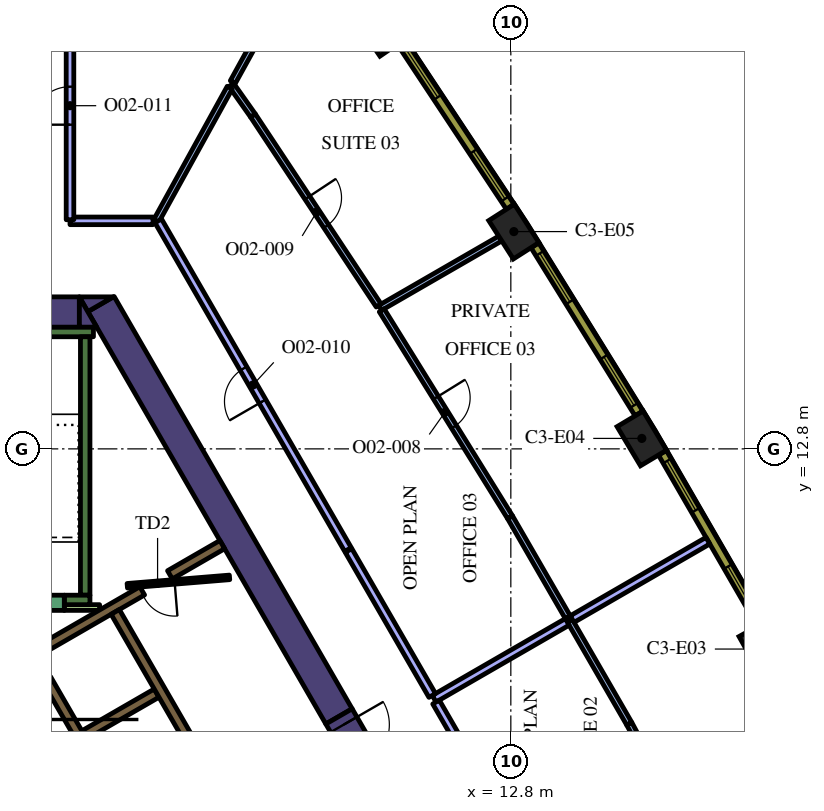
"""IFC4 building model, lengths in metres.
Left out: names, types, materials, properties, quantities, classifications, styles, units other than length and angle.
Written with IfcOpenShell. Run it as: python <this file> out.ifc"""

import sys

from ifc_helpers import new_model, si_unit, direction, frame, frame_2d, origin, origin_2d, place, context, subcontext, project, spatial, polyline, rectangle, outline, extrude, element, fill, save


model = new_model("IFC4")
c1 = context("Model", 3, precision=1e-05, world=origin(), true_north=direction((0.0, 1.0)))
c2 = subcontext(c1, "Body", "Model", "MODEL_VIEW")
j1 = project(units=[si_unit("LENGTHUNIT", "METRE"), si_unit("PLANEANGLEUNIT", "RADIAN")], contexts=[c1])
p1 = place(None, origin())
s1 = spatial("IfcSite", under=j1, at=p1, CompositionType="ELEMENT")
p2 = place(p1, origin())
s2 = spatial("IfcBuilding", under=s1, at=p2, CompositionType="ELEMENT")
p3 = place(p2, frame((0.0, 0.0, 158.4)))
s3 = spatial("IfcBuildingStorey", under=s2, at=p3, CompositionType="ELEMENT", Elevation=158.4)
for number, where, z_axis, x_axis in (
    (1, (19.447, 7.533, 0.0), (0.0, 0.0, 1.0), (-0.487, 0.874, 0.0)),
    (2, (16.247, 13.075, 0.0), (0.0, 0.0, 1.0), (-0.513, 0.858, 0.0)),
    (3, (12.88, 18.517, 0.0), (0.0, 0.0, 1.0), (-0.539, 0.842, 0.0)),
    (4, (9.348, 23.854, 0.0), (0.0, 0.0, 1.0), (-0.565, 0.825, 0.0)),
):
    element("IfcColumn", number, at=place(p3, frame(where, z_axis=z_axis, x_axis=x_axis)), inside=s3, PredefinedType="COLUMN", context=c2, shape_type="SweptSolid", body=[
        extrude(rectangle(XDim=1.2, YDim=0.8, at=origin_2d()), origin(), (0.0, 0.0, 1.0), 4.2),
    ])
p4 = place(p3, frame((8.279, 5.761, 0.0), z_axis=(0.0, 0.0, 1.0), x_axis=(-0.500010359015, 0.866019422922, 0.0)))
e5 = element("IfcWall", 5, at=p4, inside=s3, PredefinedType="SOLIDWALL", context=c2, shape_type="SweptSolid", body=[
    extrude(rectangle(XDim=12.528, YDim=0.8, at=frame_2d((6.264, 0.0))), origin(), (0.0, 0.0, 1.0), 4.2),
])
p5 = place(p3, origin())
e6 = element("IfcWall", 6, at=p5, inside=s3, PredefinedType="SOLIDWALL", context=c2, shape_type="SweptSolid", body=[
    extrude(outline(polyline([(1.443, 16.8), (2.339, 16.8), (1.667, 16.412), (1.443, 16.8)])), origin(), (0.0, 0.0, 1.0), 4.2),
])
p6 = place(p3, frame((-2.379, 16.4, 0.0), z_axis=(0.0, 0.0, 1.0), x_axis=(1.0, 0.0, 0.0)))
e7 = element("IfcWall", 7, at=p6, inside=s3, PredefinedType="SOLIDWALL", context=c2, shape_type="SweptSolid", body=[
    extrude(rectangle(XDim=3.824, YDim=0.8, at=frame_2d((1.912, 0.0))), origin(), (0.0, 0.0, 1.0), 4.2),
])
e8 = element("IfcWall", 8, at=p5, inside=s3, PredefinedType="SOLIDWALL", context=c2, shape_type="SweptSolid", body=[
    extrude(outline(polyline([(1.905, 16.0), (1.447, 16.0), (1.447, 16.793), (1.905, 16.0)])), origin(), (0.0, 0.0, 1.0), 4.2),
])
p7 = place(p3, frame((-1.817, 15.875, 0.0), z_axis=(0.0, 0.0, 1.0), x_axis=(1.0, 0.0, 0.0)))
e9 = element("IfcWall", 9, at=p7, inside=s3, PredefinedType="SOLIDWALL", context=c2, shape_type="SweptSolid", body=[
    extrude(rectangle(XDim=3.634, YDim=0.25, at=frame_2d((1.817, 0.0))), origin(), (0.0, 0.0, 1.0), 4.2),
])
p8 = place(p3, frame((1.6, 8.95, 0.0), z_axis=(0.0, 0.0, 1.0), x_axis=(0.0, 1.0, 0.0)))
e10 = element("IfcWall", 10, at=p8, inside=s3, PredefinedType="SOLIDWALL", context=c2, shape_type="SweptSolid", body=[
    extrude(rectangle(XDim=6.8, YDim=0.25, at=frame_2d((3.4, 0.0))), origin(), (0.0, 0.0, 1.0), 4.2),
])
p9 = place(p3, frame((1.05, 8.825, 0.0), z_axis=(0.0, 0.0, 1.0), x_axis=(1.0, 0.0, 0.0)))
e11 = element("IfcWall", 11, at=p9, inside=s3, PredefinedType="SOLIDWALL", context=c2, shape_type="SweptSolid", body=[
    extrude(rectangle(XDim=0.675, YDim=0.25, at=frame_2d((0.337, 0.0))), origin(), (0.0, 0.0, 1.0), 4.2),
])
p10 = place(p3, frame((6.568, -3.627, 0.0), z_axis=(0.0, 0.0, 1.0), x_axis=(-0.499999455981, 0.866025717874, 0.0)))
e12 = element("IfcWall", 12, at=p10, inside=s3, PredefinedType="SOLIDWALL", context=c2, shape_type="SweptSolid", body=[
    extrude(rectangle(XDim=11.978, YDim=0.25, at=frame_2d((5.989, 0.0))), origin(), (0.0, 0.0, 1.0), 4.2),
])
p11 = place(p3, frame((3.1, 9.064, 0.0), z_axis=(0.0, 0.0, 1.0), x_axis=(-0.866030133475, -0.499991807846, 0.0)))
e13 = element("IfcWall", 13, at=p11, inside=s3, PredefinedType="SOLIDWALL", context=c2, shape_type="SweptSolid", body=[
    extrude(rectangle(XDim=3.217, YDim=0.25, at=frame_2d((1.608, 0.0))), origin(), (0.0, 0.0, 1.0), 4.2),
])
p12 = place(p3, frame((1.574, 5.274, 0.0), z_axis=(0.0, 0.0, 1.0), x_axis=(0.866028486751, 0.499994660107, 0.0)))
e14 = element("IfcWall", 14, at=p12, inside=s3, PredefinedType="SOLIDWALL", context=c2, shape_type="SweptSolid", body=[
    extrude(rectangle(XDim=2.2, YDim=0.25, at=frame_2d((1.1, 0.0))), origin(), (0.0, 0.0, 1.0), 4.2),
])
p13 = place(p3, frame((3.83, 9.486, 0.0), z_axis=(0.0, 0.0, 1.0), x_axis=(0.865986202621, 0.500067892261, 0.0)))
e15 = element("IfcWall", 15, at=p13, inside=s3, PredefinedType="SOLIDWALL", context=c2, shape_type="SweptSolid", body=[
    extrude(rectangle(XDim=1.591, YDim=0.25, at=frame_2d((0.795, 0.0))), origin(), (0.0, 0.0, 1.0), 4.2),
])
p14 = place(p3, frame((1.05, 8.625, 0.0), z_axis=(0.0, 0.0, 1.0), x_axis=(1.0, 0.0, 0.0)))
e16 = element("IfcWall", 16, at=p14, inside=s3, PredefinedType="PARTITIONING", context=c2, shape_type="SweptSolid", body=[
    extrude(rectangle(XDim=0.929, YDim=0.15, at=frame_2d((0.464, 0.0))), origin(), (0.0, 0.0, 1.0), 3.15),
])
p15 = place(p3, frame((8.565, -2.185, 0.0), z_axis=(0.0, 0.0, 1.0), x_axis=(-0.499997954832, 0.866026584559, 0.0)))
e17 = element("IfcWall", 17, at=p15, inside=s3, PredefinedType="SOLIDWALL", context=c2, shape_type="SweptSolid", body=[
    extrude(rectangle(XDim=12.35, YDim=0.25, at=frame_2d((6.175, 0.0))), origin(), (0.0, 0.0, 1.0), 4.2),
])
p16 = place(p15, frame((0.585, 0.0, 0.0)))
e18 = element("IfcOpeningElement", 18, at=p16, cuts=e17, PredefinedType="OPENING", context=c2, shape_type="SweptSolid", body=[
    extrude(rectangle(XDim=1.1, YDim=2.1, at=frame_2d((0.55, 1.05))), frame((0.0, 0.135, 0.0), z_axis=(0.0, -1.0, 0.0), x_axis=(1.0, 0.0, 0.0)), (0.0, 0.0, 1.0), 0.27),
])
p17 = place(p3, frame((1.05, 8.75, 0.0), z_axis=(0.0, 0.0, 1.0), x_axis=(-1.0, 0.0, 0.0)))
e19 = element("IfcWall", 19, at=p17, inside=s3, PredefinedType="SOLIDWALL", context=c2, shape_type="SweptSolid", body=[
    extrude(rectangle(XDim=2.1, YDim=0.4, at=frame_2d((1.05, 0.0))), origin(), (0.0, 0.0, 1.0), 4.2),
])
p18 = place(p17, frame((0.45, 0.0, 0.0)))
e20 = element("IfcOpeningElement", 20, at=p18, cuts=e19, PredefinedType="OPENING", context=c2, shape_type="SweptSolid", body=[
    extrude(rectangle(XDim=1.2, YDim=2.1, at=frame_2d((0.6, 1.05))), frame((0.0, 0.21, 0.0), z_axis=(0.0, -1.0, 0.0), x_axis=(1.0, 0.0, 0.0)), (0.0, 0.0, 1.0), 0.42),
])
p19 = place(p3, frame((5.398, 9.419, 0.0), z_axis=(0.0, 0.0, 1.0), x_axis=(-0.996653416376, -0.081743303248, 0.0)))
e21 = element("IfcWall", 21, at=p19, inside=s3, PredefinedType="PARTITIONING", context=c2, shape_type="SweptSolid", body=[
    extrude(rectangle(XDim=2.7, YDim=0.12, at=frame_2d((1.35, 0.0))), origin(), (0.0, 0.0, 1.0), 3.15),
])
p20 = place(p19, frame((1.45, 0.0, 0.0)))
e22 = element("IfcOpeningElement", 22, at=p20, cuts=e21, PredefinedType="OPENING", context=c2, shape_type="SweptSolid", body=[
    extrude(rectangle(XDim=0.9, YDim=2.1, at=frame_2d((0.45, 1.05))), frame((0.0, 0.07, 0.0), z_axis=(0.0, -1.0, 0.0), x_axis=(1.0, 0.0, 0.0)), (0.0, 0.0, 1.0), 0.14),
])
p21 = place(p3, frame((8.279, 5.761, 0.0), z_axis=(0.0, 0.0, 1.0), x_axis=(0.500062241894, -0.865989465428, 0.0)))
e23 = element("IfcWall", 23, at=p21, inside=s3, PredefinedType="SOLIDWALL", context=c2, shape_type="SweptSolid", body=[
    extrude(rectangle(XDim=1.7, YDim=0.8, at=frame_2d((0.85, 0.0))), origin(), (0.0, 0.0, 1.0), 4.2),
])
p22 = place(p21, frame((0.25, 0.0, 0.0)))
e24 = element("IfcOpeningElement", 24, at=p22, cuts=e23, PredefinedType="OPENING", context=c2, shape_type="SweptSolid", body=[
    extrude(rectangle(XDim=1.2, YDim=2.1, at=frame_2d((0.6, 1.05))), frame((0.0, 0.41, 0.0), z_axis=(0.0, -1.0, 0.0), x_axis=(1.0, 0.0, 0.0)), (0.0, 0.0, 1.0), 0.82),
])
p23 = place(p3, frame((15.917, 5.566, 0.0), z_axis=(0.0, 0.0, 1.0), x_axis=(0.472485737981, -0.881338316088, 0.0)))
e25 = element("IfcWall", 25, at=p23, inside=s3, PredefinedType="PARTITIONING", context=c2, shape_type="SweptSolid", body=[
    extrude(rectangle(XDim=6.407, YDim=0.15, at=frame_2d((3.204, 0.0))), origin(), (0.0, 0.0, 1.0), 3.15),
])
p24 = place(p23, frame((2.707, 0.0, 0.0)))
e26 = element("IfcOpeningElement", 26, at=p24, cuts=e25, PredefinedType="OPENING", context=c2, shape_type="SweptSolid", body=[
    extrude(rectangle(XDim=0.9, YDim=2.1, at=frame_2d((0.45, 1.05))), frame((0.0, 0.085, 0.0), z_axis=(0.0, -1.0, 0.0), x_axis=(1.0, 0.0, 0.0)), (0.0, 0.0, 1.0), 0.17),
])
p25 = place(p3, frame((15.917, 5.566, 0.0), z_axis=(0.0, 0.0, 1.0), x_axis=(-0.499996312652, 0.866027532665, 0.0)))
e27 = element("IfcWall", 27, at=p25, inside=s3, PredefinedType="PARTITIONING", context=c2, shape_type="SweptSolid", body=[
    extrude(rectangle(XDim=3.138, YDim=0.15, at=frame_2d((1.569, 0.0))), origin(), (0.0, 0.0, 1.0), 3.15),
])
p26 = place(p3, frame((14.413, 8.322, 0.0), z_axis=(0.0, 0.0, 1.0), x_axis=(0.866034795751, 0.499983732284, 0.0)))
e28 = element("IfcWall", 28, at=p26, inside=s3, PredefinedType="PARTITIONING", context=c2, shape_type="SweptSolid", body=[
    extrude(rectangle(XDim=4.125, YDim=0.2, at=frame_2d((2.062, 0.0))), origin(), (0.0, 0.0, 1.0), 3.15),
])
p27 = place(p3, frame((10.782, 6.225, 0.0), z_axis=(0.0, 0.0, 1.0), x_axis=(0.866034752867, 0.499983806564, 0.0)))
e29 = element("IfcWall", 29, at=p27, inside=s3, PredefinedType="PARTITIONING", context=c2, shape_type="SweptSolid", body=[
    extrude(rectangle(XDim=4.043, YDim=0.2, at=frame_2d((2.021, 0.0))), origin(), (0.0, 0.0, 1.0), 3.15),
])
p28 = place(p3, frame((13.032, 2.328, 0.0), z_axis=(0.0, 0.0, 1.0), x_axis=(-0.499988222896, 0.866032203192, 0.0)))
e30 = element("IfcWall", 30, at=p28, inside=s3, PredefinedType="PARTITIONING", context=c2, shape_type="SweptSolid", body=[
    extrude(rectangle(XDim=4.4, YDim=0.2, at=frame_2d((2.2, 0.0))), origin(), (0.0, 0.0, 1.0), 3.15),
])
p29 = place(p3, frame((9.363, 16.511, 0.0), z_axis=(0.0, 0.0, 1.0), x_axis=(0.866006134298, 0.500033374244, 0.0)))
e31 = element("IfcWall", 31, at=p29, inside=s3, PredefinedType="PARTITIONING", context=c2, shape_type="SweptSolid", body=[
    extrude(rectangle(XDim=3.648, YDim=0.15, at=frame_2d((1.824, 0.0))), origin(), (0.0, 0.0, 1.0), 3.15),
])
p30 = place(p3, frame((14.299, 8.371, 0.0), z_axis=(0.0, 0.0, 1.0), x_axis=(-0.500019211527, 0.86601431172, 0.0)))
e32 = element("IfcWall", 32, at=p30, inside=s3, PredefinedType="PARTITIONING", context=c2, shape_type="SweptSolid", body=[
    extrude(rectangle(XDim=3.039, YDim=0.15, at=frame_2d((1.519, 0.0))), origin(), (0.0, 0.0, 1.0), 3.15),
])
p31 = place(p3, frame((9.403, 16.447, 0.0), z_axis=(0.0, 0.0, 1.0), x_axis=(0.527026092571, -0.849849102929, 0.0)))
e33 = element("IfcWall", 33, at=p31, inside=s3, PredefinedType="PARTITIONING", context=c2, shape_type="SweptSolid", body=[
    extrude(rectangle(XDim=6.407, YDim=0.15, at=frame_2d((3.204, 0.0))), origin(), (0.0, 0.0, 1.0), 3.15),
])
p32 = place(p31, frame((2.707, 0.0, 0.0)))
e34 = element("IfcOpeningElement", 34, at=p32, cuts=e33, PredefinedType="OPENING", context=c2, shape_type="SweptSolid", body=[
    extrude(rectangle(XDim=0.9, YDim=2.1, at=frame_2d((0.45, 1.05))), frame((0.0, 0.085, 0.0), z_axis=(0.0, -1.0, 0.0), x_axis=(1.0, 0.0, 0.0)), (0.0, 0.0, 1.0), 0.17),
])
p33 = place(p3, frame((6.013, 21.573, 0.0), z_axis=(0.0, 0.0, 1.0), x_axis=(0.551906048292, -0.833906298009, 0.0)))
e35 = element("IfcWall", 35, at=p33, inside=s3, PredefinedType="PARTITIONING", context=c2, shape_type="SweptSolid", body=[
    extrude(rectangle(XDim=5.995, YDim=0.15, at=frame_2d((2.998, 0.0))), origin(), (0.0, 0.0, 1.0), 3.15),
])
p34 = place(p33, frame((2.595, 0.0, 0.0)))
e36 = element("IfcOpeningElement", 36, at=p34, cuts=e35, PredefinedType="OPENING", context=c2, shape_type="SweptSolid", body=[
    extrude(rectangle(XDim=0.9, YDim=2.1, at=frame_2d((0.45, 1.05))), frame((0.0, 0.085, 0.0), z_axis=(0.0, -1.0, 0.0), x_axis=(1.0, 0.0, 0.0)), (0.0, 0.0, 1.0), 0.17),
])
p35 = place(p3, frame((6.013, 21.573, 0.0), z_axis=(0.0, 0.0, 1.0), x_axis=(-0.576965221715, 0.816768714467, 0.0)))
e37 = element("IfcWall", 37, at=p35, inside=s3, PredefinedType="PARTITIONING", context=c2, shape_type="SweptSolid", body=[
    extrude(rectangle(XDim=0.986, YDim=0.15, at=frame_2d((0.493, 0.0))), origin(), (0.0, 0.0, 1.0), 3.15),
])
p36 = place(p3, frame((5.484, 22.451, 0.0), z_axis=(0.0, 0.0, 1.0), x_axis=(0.483018213307, 0.875610304652, 0.0)))
e38 = element("IfcWall", 38, at=p36, inside=s3, PredefinedType="PARTITIONING", context=c2, shape_type="SweptSolid", body=[
    extrude(rectangle(XDim=4.584, YDim=0.15, at=frame_2d((2.292, 0.0))), origin(), (0.0, 0.0, 1.0), 3.15),
])
p37 = place(p3, frame((3.47, 18.8, 0.0), z_axis=(0.0, 0.0, 1.0), x_axis=(0.483004783308, 0.87561771299, 0.0)))
e39 = element("IfcWall", 39, at=p37, inside=s3, PredefinedType="PARTITIONING", context=c2, shape_type="SweptSolid", body=[
    extrude(rectangle(XDim=4.003, YDim=0.15, at=frame_2d((2.001, 0.0))), origin(), (0.0, 0.0, 1.0), 3.15),
])
p38 = place(p3, frame((10.732, 6.312, 0.0), z_axis=(0.0, 0.0, 1.0), x_axis=(-0.499984786451, 0.866034187153, 0.0)))
e40 = element("IfcWall", 40, at=p38, inside=s3, PredefinedType="PARTITIONING", context=c2, shape_type="SweptSolid", body=[
    extrude(rectangle(XDim=4.404, YDim=0.2, at=frame_2d((2.202, 0.0))), origin(), (0.0, 0.0, 1.0), 3.15),
])
p39 = place(p3, frame((8.515, 10.152, 0.0), z_axis=(0.0, 0.0, 1.0), x_axis=(-0.499998974385, 0.866025995923, 0.0)))
e41 = element("IfcWall", 41, at=p39, inside=s3, PredefinedType="PARTITIONING", context=c2, shape_type="SweptSolid", body=[
    extrude(rectangle(XDim=9.986, YDim=0.2, at=frame_2d((4.993, 0.0))), origin(), (0.0, 0.0, 1.0), 3.15),
])
p40 = place(p39, frame((4.5, 0.0, 0.0)))
e42 = element("IfcOpeningElement", 42, at=p40, cuts=e41, PredefinedType="OPENING", context=c2, shape_type="SweptSolid", body=[
    extrude(rectangle(XDim=1.0, YDim=2.1, at=frame_2d((0.5, 1.05))), frame((0.0, 0.11, 0.0), z_axis=(0.0, -1.0, 0.0), x_axis=(1.0, 0.0, 0.0)), (0.0, 0.0, 1.0), 0.22),
])
p41 = place(p3, frame((3.385, 18.8, 0.0), z_axis=(0.0, 0.0, 1.0), x_axis=(-1.0, 0.0, 0.0)))
e43 = element("IfcWall", 43, at=p41, inside=s3, PredefinedType="PARTITIONING", context=c2, shape_type="SweptSolid", body=[
    extrude(rectangle(XDim=2.185, YDim=0.2, at=frame_2d((1.092, 0.0))), origin(), (0.0, 0.0, 1.0), 3.15),
])
p42 = place(p3, frame((1.2, 18.83, 0.0), z_axis=(0.0, 0.0, 1.0), x_axis=(0.0, 1.0, 0.0)))
e44 = element("IfcWall", 44, at=p42, inside=s3, PredefinedType="PARTITIONING", context=c2, shape_type="SweptSolid", body=[
    extrude(rectangle(XDim=5.97, YDim=0.2, at=frame_2d((2.985, 0.0))), origin(), (0.0, 0.0, 1.0), 3.15),
])
p43 = place(p42, frame((2.5, 0.0, 0.0)))
e45 = element("IfcOpeningElement", 45, at=p43, cuts=e44, PredefinedType="OPENING", context=c2, shape_type="SweptSolid", body=[
    extrude(rectangle(XDim=1.0, YDim=2.1, at=frame_2d((0.5, 1.05))), frame((0.0, 0.11, 0.0), z_axis=(0.0, -1.0, 0.0), x_axis=(1.0, 0.0, 0.0)), (0.0, 0.0, 1.0), 0.22),
])
p44 = place(p3, frame((19.391, 8.191, 0.0), z_axis=(0.0, 0.0, 1.0), x_axis=(-0.500009456303, 0.866019944116, 0.0)))
e46 = element("IfcWall", 46, at=p44, inside=s3, PredefinedType="SOLIDWALL", context=c2, shape_type="SweptSolid", body=[
    extrude(rectangle(XDim=5.204, YDim=0.24, at=frame_2d((2.602, 0.0))), origin(), (0.0, 0.0, 1.0), 3.95),
])
p45 = place(p44, frame((0.248, 0.0, 0.9)))
e47 = element("IfcOpeningElement", 47, at=p45, cuts=e46, PredefinedType="OPENING", context=c2, shape_type="SweptSolid", body=[
    extrude(rectangle(XDim=1.5, YDim=2.55, at=frame_2d((0.75, 1.275))), frame((0.0, 0.13, 0.0), z_axis=(0.0, -1.0, 0.0), x_axis=(1.0, 0.0, 0.0)), (0.0, 0.0, 1.0), 0.26),
])
p46 = place(p44, frame((3.455, 0.0, 0.9)))
e48 = element("IfcOpeningElement", 48, at=p46, cuts=e46, PredefinedType="OPENING", context=c2, shape_type="SweptSolid", body=[
    extrude(rectangle(XDim=1.5, YDim=2.55, at=frame_2d((0.75, 1.275))), frame((0.0, 0.13, 0.0), z_axis=(0.0, -1.0, 0.0), x_axis=(1.0, 0.0, 0.0)), (0.0, 0.0, 1.0), 0.26),
])
p47 = place(p3, frame((16.171, 13.731, 0.0), z_axis=(0.0, 0.0, 1.0), x_axis=(-0.526197926587, 0.850362124072, 0.0)))
e49 = element("IfcWall", 49, at=p47, inside=s3, PredefinedType="SOLIDWALL", context=c2, shape_type="SweptSolid", body=[
    extrude(rectangle(XDim=5.203, YDim=0.24, at=frame_2d((2.602, 0.0))), origin(), (0.0, 0.0, 1.0), 3.95),
])
p48 = place(p47, frame((0.248, 0.0, 0.9)))
e50 = element("IfcOpeningElement", 50, at=p48, cuts=e49, PredefinedType="OPENING", context=c2, shape_type="SweptSolid", body=[
    extrude(rectangle(XDim=1.5, YDim=2.55, at=frame_2d((0.75, 1.275))), frame((0.0, 0.13, 0.0), z_axis=(0.0, -1.0, 0.0), x_axis=(1.0, 0.0, 0.0)), (0.0, 0.0, 1.0), 0.26),
])
p49 = place(p47, frame((3.455, 0.0, 0.9)))
e51 = element("IfcOpeningElement", 51, at=p49, cuts=e49, PredefinedType="OPENING", context=c2, shape_type="SweptSolid", body=[
    extrude(rectangle(XDim=1.5, YDim=2.55, at=frame_2d((0.75, 1.275))), frame((0.0, 0.13, 0.0), z_axis=(0.0, -1.0, 0.0), x_axis=(1.0, 0.0, 0.0)), (0.0, 0.0, 1.0), 0.26),
])
p50 = place(p3, frame((12.783, 19.171, 0.0), z_axis=(0.0, 0.0, 1.0), x_axis=(-0.551892811511, 0.833915058386, 0.0)))
e52 = element("IfcWall", 52, at=p50, inside=s3, PredefinedType="SOLIDWALL", context=c2, shape_type="SweptSolid", body=[
    extrude(rectangle(XDim=5.204, YDim=0.24, at=frame_2d((2.602, 0.0))), origin(), (0.0, 0.0, 1.0), 3.95),
])
p51 = place(p50, frame((0.248, 0.0, 0.9)))
e53 = element("IfcOpeningElement", 53, at=p51, cuts=e52, PredefinedType="OPENING", context=c2, shape_type="SweptSolid", body=[
    extrude(rectangle(XDim=1.5, YDim=2.55, at=frame_2d((0.75, 1.275))), frame((0.0, 0.13, 0.0), z_axis=(0.0, -1.0, 0.0), x_axis=(1.0, 0.0, 0.0)), (0.0, 0.0, 1.0), 0.26),
])
p52 = place(p50, frame((3.455, 0.0, 0.9)))
e54 = element("IfcOpeningElement", 54, at=p52, cuts=e52, PredefinedType="OPENING", context=c2, shape_type="SweptSolid", body=[
    extrude(rectangle(XDim=1.5, YDim=2.55, at=frame_2d((0.75, 1.275))), frame((0.0, 0.13, 0.0), z_axis=(0.0, -1.0, 0.0), x_axis=(1.0, 0.0, 0.0)), (0.0, 0.0, 1.0), 0.26),
])
p53 = place(p20, origin())
e55 = element("IfcDoor", 55, at=p53, inside=s3, OperationType="SINGLE_SWING_LEFT", PredefinedType="DOOR", context=c2, shape_type="SweptSolid", body=[
    extrude(rectangle(XDim=0.9, YDim=2.1, at=frame_2d((0.45, 1.05))), frame((0.0, 0.025, 0.0), z_axis=(0.0, -1.0, 0.0), x_axis=(1.0, 0.0, 0.0)), (0.0, 0.0, 1.0), 0.05),
])
fill(e22, e55)
p54 = place(p22, origin())
e56 = element("IfcDoor", 56, at=p54, inside=s3, OperationType="SINGLE_SWING_LEFT", PredefinedType="DOOR", context=c2, shape_type="SweptSolid", body=[
    extrude(rectangle(XDim=1.2, YDim=2.1, at=frame_2d((0.6, 1.05))), frame((0.0, 0.025, 0.0), z_axis=(0.0, -1.0, 0.0), x_axis=(1.0, 0.0, 0.0)), (0.0, 0.0, 1.0), 0.05),
])
fill(e24, e56)
p55 = place(p32, origin())
e57 = element("IfcDoor", 57, at=p55, inside=s3, OperationType="SINGLE_SWING_LEFT", PredefinedType="DOOR", context=c2, shape_type="SweptSolid", body=[
    extrude(rectangle(XDim=0.9, YDim=2.1, at=frame_2d((0.45, 1.05))), frame((0.0, 0.025, 0.0), z_axis=(0.0, -1.0, 0.0), x_axis=(1.0, 0.0, 0.0)), (0.0, 0.0, 1.0), 0.05),
])
fill(e34, e57)
p56 = place(p34, origin())
e58 = element("IfcDoor", 58, at=p56, inside=s3, OperationType="SINGLE_SWING_RIGHT", PredefinedType="DOOR", context=c2, shape_type="SweptSolid", body=[
    extrude(rectangle(XDim=0.9, YDim=2.1, at=frame_2d((0.45, 1.05))), frame((0.0, 0.025, 0.0), z_axis=(0.0, -1.0, 0.0), x_axis=(1.0, 0.0, 0.0)), (0.0, 0.0, 1.0), 0.05),
])
fill(e36, e58)
p57 = place(p40, origin())
e59 = element("IfcDoor", 59, at=p57, inside=s3, OperationType="SINGLE_SWING_RIGHT", PredefinedType="DOOR", context=c2, shape_type="SweptSolid", body=[
    extrude(rectangle(XDim=1.0, YDim=2.1, at=frame_2d((0.5, 1.05))), frame((0.0, 0.025, 0.0), z_axis=(0.0, -1.0, 0.0), x_axis=(1.0, 0.0, 0.0)), (0.0, 0.0, 1.0), 0.05),
])
fill(e42, e59)
p58 = place(p43, origin())
e60 = element("IfcDoor", 60, at=p58, inside=s3, OperationType="SINGLE_SWING_RIGHT", PredefinedType="DOOR", context=c2, shape_type="SweptSolid", body=[
    extrude(rectangle(XDim=1.0, YDim=2.1, at=frame_2d((0.5, 1.05))), frame((0.0, 0.025, 0.0), z_axis=(0.0, -1.0, 0.0), x_axis=(1.0, 0.0, 0.0)), (0.0, 0.0, 1.0), 0.05),
])
fill(e45, e60)
p59 = place(p45, origin())
e61 = element("IfcWindow", 61, at=p59, inside=s3, PartitioningType="SINGLE_PANEL", PredefinedType="WINDOW", context=c2, shape_type="SweptSolid", body=[
    extrude(rectangle(XDim=1.5, YDim=2.55, at=frame_2d((0.75, 1.275))), frame((0.0, 0.04, 0.0), z_axis=(0.0, -1.0, 0.0), x_axis=(1.0, 0.0, 0.0)), (0.0, 0.0, 1.0), 0.06),
])
fill(e47, e61)
p60 = place(p46, origin())
e62 = element("IfcWindow", 62, at=p60, inside=s3, PartitioningType="SINGLE_PANEL", PredefinedType="WINDOW", context=c2, shape_type="SweptSolid", body=[
    extrude(rectangle(XDim=1.5, YDim=2.55, at=frame_2d((0.75, 1.275))), frame((0.0, 0.04, 0.0), z_axis=(0.0, -1.0, 0.0), x_axis=(1.0, 0.0, 0.0)), (0.0, 0.0, 1.0), 0.06),
])
fill(e48, e62)
p61 = place(p48, origin())
e63 = element("IfcWindow", 63, at=p61, inside=s3, PartitioningType="SINGLE_PANEL", PredefinedType="WINDOW", context=c2, shape_type="SweptSolid", body=[
    extrude(rectangle(XDim=1.5, YDim=2.55, at=frame_2d((0.75, 1.275))), frame((0.0, 0.04, 0.0), z_axis=(0.0, -1.0, 0.0), x_axis=(1.0, 0.0, 0.0)), (0.0, 0.0, 1.0), 0.06),
])
fill(e50, e63)
p62 = place(p49, origin())
e64 = element("IfcWindow", 64, at=p62, inside=s3, PartitioningType="SINGLE_PANEL", PredefinedType="WINDOW", context=c2, shape_type="SweptSolid", body=[
    extrude(rectangle(XDim=1.5, YDim=2.55, at=frame_2d((0.75, 1.275))), frame((0.0, 0.04, 0.0), z_axis=(0.0, -1.0, 0.0), x_axis=(1.0, 0.0, 0.0)), (0.0, 0.0, 1.0), 0.06),
])
fill(e51, e64)
p63 = place(p51, origin())
e65 = element("IfcWindow", 65, at=p63, inside=s3, PartitioningType="SINGLE_PANEL", PredefinedType="WINDOW", context=c2, shape_type="SweptSolid", body=[
    extrude(rectangle(XDim=1.5, YDim=2.55, at=frame_2d((0.75, 1.275))), frame((0.0, 0.04, 0.0), z_axis=(0.0, -1.0, 0.0), x_axis=(1.0, 0.0, 0.0)), (0.0, 0.0, 1.0), 0.06),
])
fill(e53, e65)
p64 = place(p52, origin())
e66 = element("IfcWindow", 66, at=p64, inside=s3, PartitioningType="SINGLE_PANEL", PredefinedType="WINDOW", context=c2, shape_type="SweptSolid", body=[
    extrude(rectangle(XDim=1.5, YDim=2.55, at=frame_2d((0.75, 1.275))), frame((0.0, 0.04, 0.0), z_axis=(0.0, -1.0, 0.0), x_axis=(1.0, 0.0, 0.0)), (0.0, 0.0, 1.0), 0.06),
])
fill(e54, e66)
save(model, sys.argv[1])
